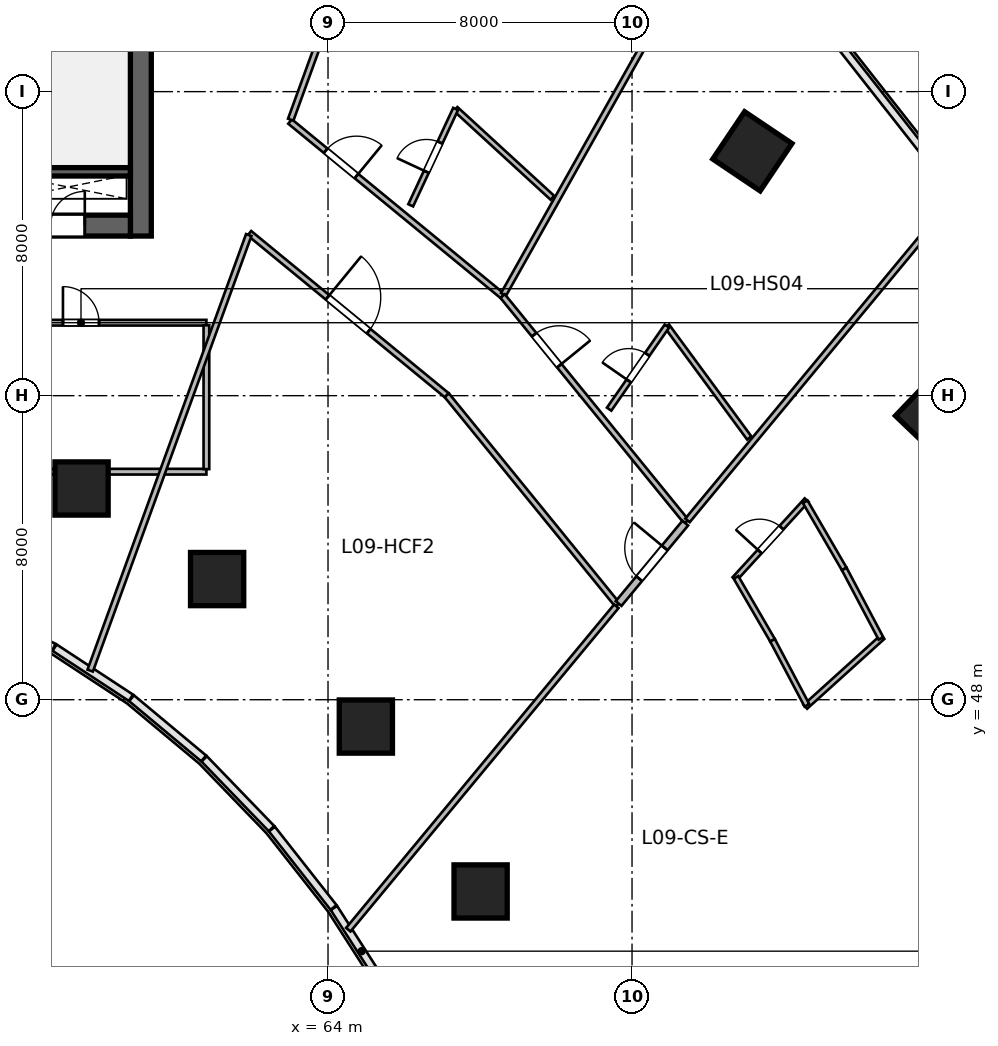
"""IFC4 building model, lengths in metres.
Left out: names, types, materials, properties, quantities, classifications, styles, units other than length and angle.
Written with IfcOpenShell. Run it as: python <this file> out.ifc"""

import sys

from ifc_helpers import new_model, si_unit, direction, frame, frame_2d, origin, origin_2d, place, context, subcontext, project, spatial, rectangle, circle, extrude, source, transform, mapped, element, fill, save


model = new_model("IFC4")
c1 = context("Model", 3, precision=1e-05, world=origin(), true_north=direction((0.0, 1.0)))
c2 = subcontext(c1, "Body", "Model", "MODEL_VIEW")
j1 = project(units=[si_unit("LENGTHUNIT", "METRE"), si_unit("PLANEANGLEUNIT", "RADIAN")], contexts=[c1])
p1 = place(None, origin())
s1 = spatial("IfcSite", under=j1, at=p1, CompositionType="ELEMENT")
p2 = place(p1, origin())
s2 = spatial("IfcBuilding", under=s1, at=p2, CompositionType="ELEMENT")
p3 = place(p2, frame((0.0, 0.0, 46.2)))
s3 = spatial("IfcBuildingStorey", under=s2, at=p3, CompositionType="ELEMENT", Elevation=46.2)
m1 = source(origin(), c2, "Body", "SweptSolid", [
    extrude(rectangle(XDim=12.0, YDim=0.55, at=frame_2d((6.0, 0.0))), origin(), (0.0, 0.0, 1.0), 3.6),
])
p4 = place(p3, frame((59.075, 60.2, 0.0), z_axis=(0.0, 0.0, 1.0), x_axis=(0.0, 1.0, 0.0)))
e1 = element("IfcWall", 1, at=p4, inside=s3, PredefinedType="SHEAR", context=c2, shape_type="MappedRepresentation", body=[
    mapped(m1, transform((0.0, 0.0, 0.0), scale=1.0)),
])
m2 = source(origin(), c2, "Body", "SweptSolid", [
    extrude(rectangle(XDim=21.6, YDim=0.55, at=frame_2d((10.8, 0.0))), origin(), (0.0, 0.0, 1.0), 3.6),
])
p5 = place(p3, frame((37.2, 60.475, 0.0), z_axis=(0.0, 0.0, 1.0), x_axis=(1.0, 0.0, 0.0)))
e2 = element("IfcWall", 2, at=p5, inside=s3, PredefinedType="SHEAR", context=c2, shape_type="MappedRepresentation", body=[
    mapped(m2, transform((0.0, 0.0, 0.0), scale=1.0)),
])
p6 = place(p5, frame((1.1, 0.0, 0.0)))
e3 = element("IfcOpeningElement", 3, at=p6, cuts=e2, PredefinedType="OPENING", context=c2, shape_type="SweptSolid", body=[
    extrude(rectangle(XDim=1.15, YDim=2.15, at=frame_2d((0.575, 1.075))), frame((0.0, 0.285, 0.0), z_axis=(0.0, -1.0, 0.0), x_axis=(1.0, 0.0, 0.0)), (0.0, 0.0, 1.0), 0.57),
])
p7 = place(p5, frame((19.5, 0.0, 0.0)))
e4 = element("IfcOpeningElement", 4, at=p7, cuts=e2, PredefinedType="OPENING", context=c2, shape_type="SweptSolid", body=[
    extrude(rectangle(XDim=0.9, YDim=2.1, at=frame_2d((0.45, 1.05))), frame((0.0, 0.285, 0.0), z_axis=(0.0, -1.0, 0.0), x_axis=(1.0, 0.0, 0.0)), (0.0, 0.0, 1.0), 0.57),
])
p8 = place(p5, frame((12.02, 0.0, 0.0)))
e5 = element("IfcOpeningElement", 5, at=p8, cuts=e2, PredefinedType="OPENING", context=c2, shape_type="SweptSolid", body=[
    extrude(rectangle(XDim=1.6, YDim=2.15, at=frame_2d((0.8, 1.075))), frame((0.0, 0.285, 0.0), z_axis=(0.0, -1.0, 0.0), x_axis=(1.0, 0.0, 0.0)), (0.0, 0.0, 1.0), 0.57),
])
m3 = source(origin(), c2, "Body", "SweptSolid", [
    extrude(rectangle(XDim=3.27, YDim=0.22, at=frame_2d((1.635, 0.0))), origin(), (0.0, 0.0, 1.0), 3.6),
])
p9 = place(p3, frame((55.53, 61.89, 0.0), z_axis=(0.0, 0.0, 1.0), x_axis=(1.0, 0.0, 0.0)))
e6 = element("IfcWall", 6, at=p9, inside=s3, PredefinedType="SHEAR", context=c2, shape_type="MappedRepresentation", body=[
    mapped(m3, transform((0.0, 0.0, 0.0), scale=1.0)),
])
m4 = source(origin(), c2, "Body", "SweptSolid", [
    extrude(circle(Radius=0.7, at=origin_2d()), origin(), (0.0, 0.0, 1.0), 3.6),
])
for number, where, z_axis, x_axis in (
    (7, (57.515, 53.558, 0.0), (0.0, 0.0, 1.0), (0.289, 0.957, 0.0)),
    (8, (61.082, 51.175, 0.0), (0.0, 0.0, 1.0), (0.409, 0.912, 0.0)),
    (9, (64.996, 47.294, 0.0), (0.0, 0.0, 1.0), (0.558, 0.83, 0.0)),
):
    element("IfcColumn", number, at=place(p3, frame(where, z_axis=z_axis, x_axis=x_axis)), inside=s3, PredefinedType="COLUMN", context=c2, shape_type="MappedRepresentation", body=[
        mapped(m4, transform((0.0, 0.0, 0.0), scale=1.0)),
    ])
m5 = source(origin(), c2, "Body", "SweptSolid", [
    extrude(rectangle(XDim=1.5, YDim=1.5, at=origin_2d()), origin(), (0.0, 0.0, 1.0), 3.6),
])
p10 = place(p3, frame((75.167, 62.43, 0.0), z_axis=(0.0, 0.0, 1.0), x_axis=(0.55774510898, 0.830012285095, 0.0)))
e10 = element("IfcColumn", 10, at=p10, inside=s3, PredefinedType="COLUMN", context=c2, shape_type="MappedRepresentation", body=[
    mapped(m5, transform((0.0, 0.0, 0.0), scale=1.0)),
])
p11 = place(p3, frame((68.015, 42.955, 0.0), z_axis=(0.0, 0.0, 1.0), x_axis=(0.690756218984, 0.723087716626, 0.0)))
e11 = element("IfcColumn", 11, at=p11, inside=s3, PredefinedType="COLUMN", context=c2, shape_type="MappedRepresentation", body=[
    mapped(m4, transform((0.0, 0.0, 0.0), scale=1.0)),
])
p12 = place(p3, frame((79.993, 55.494, 0.0), z_axis=(0.0, 0.0, 1.0), x_axis=(0.690756218984, 0.723087716626, 0.0)))
e12 = element("IfcColumn", 12, at=p12, inside=s3, PredefinedType="COLUMN", context=c2, shape_type="MappedRepresentation", body=[
    mapped(m5, transform((0.0, 0.0, 0.0), scale=1.0)),
])
m6 = source(origin(), c2, "Body", "SweptSolid", [
    extrude(rectangle(XDim=6.6, YDim=0.15, at=frame_2d((3.3, 0.0))), origin(), (0.0, 0.0, 1.0), 2.803),
])
p13 = place(p3, frame((54.2, 54.0, 0.0), z_axis=(0.0, 0.0, 1.0), x_axis=(1.0, 0.0, 0.0)))
e13 = element("IfcWall", 13, at=p13, inside=s3, PredefinedType="PARTITIONING", context=c2, shape_type="MappedRepresentation", body=[
    mapped(m6, transform((0.0, 0.0, 0.0), scale=1.0)),
])
m7 = source(origin(), c2, "Body", "SweptSolid", [
    extrude(rectangle(XDim=6.6, YDim=0.15, at=frame_2d((3.3, 0.0))), origin(), (0.0, 0.0, 1.0), 3.36),
])
p14 = place(p3, frame((54.2, 57.92, 0.0), z_axis=(0.0, 0.0, 1.0), x_axis=(1.0, 0.0, 0.0)))
e14 = element("IfcWall", 14, at=p14, inside=s3, PredefinedType="PARTITIONING", context=c2, shape_type="MappedRepresentation", body=[
    mapped(m7, transform((0.0, 0.0, 0.0), scale=1.0)),
])
p15 = place(p14, frame((2.825, 0.0, 0.0)))
e15 = element("IfcOpeningElement", 15, at=p15, cuts=e14, PredefinedType="OPENING", context=c2, shape_type="SweptSolid", body=[
    extrude(rectangle(XDim=0.95, YDim=2.1, at=frame_2d((0.475, 1.05))), frame((0.0, 0.085, 0.0), z_axis=(0.0, -1.0, 0.0), x_axis=(1.0, 0.0, 0.0)), (0.0, 0.0, 1.0), 0.17),
])
m8 = source(origin(), c2, "Body", "SweptSolid", [
    extrude(rectangle(XDim=3.785, YDim=0.15, at=frame_2d((1.893, 0.0))), origin(), (0.0, 0.0, 1.0), 3.36),
])
p16 = place(p3, frame((60.8, 54.067, 0.0), z_axis=(0.0, 0.0, 1.0), x_axis=(0.0, 1.0, 0.0)))
e16 = element("IfcWall", 16, at=p16, inside=s3, PredefinedType="PARTITIONING", context=c2, shape_type="MappedRepresentation", body=[
    mapped(m8, transform((0.0, 0.0, 0.0), scale=1.0)),
])
m9 = source(origin(), c2, "Body", "SweptSolid", [
    extrude(rectangle(XDim=7.237, YDim=0.15, at=frame_2d((3.618, 0.0))), origin(), (0.0, 0.0, 1.0), 3.36),
])
p17 = place(p3, frame((63.001, 63.214, 0.0), z_axis=(0.0, 0.0, 1.0), x_axis=(0.772813707793, -0.634632943557, 0.0)))
e17 = element("IfcWall", 17, at=p17, inside=s3, PredefinedType="PARTITIONING", context=c2, shape_type="MappedRepresentation", body=[
    mapped(m9, transform((0.0, 0.0, 0.0), scale=1.0)),
])
p18 = place(p17, frame((1.212, 0.0, 0.0)))
e18 = element("IfcOpeningElement", 18, at=p18, cuts=e17, PredefinedType="OPENING", context=c2, shape_type="SweptSolid", body=[
    extrude(rectangle(XDim=1.05, YDim=2.15, at=frame_2d((0.525, 1.075))), frame((0.0, 0.085, 0.0), z_axis=(0.0, -1.0, 0.0), x_axis=(1.0, 0.0, 0.0)), (0.0, 0.0, 1.0), 0.17),
])
m10 = source(origin(), c2, "Body", "SweptSolid", [
    extrude(rectangle(XDim=12.088, YDim=0.15, at=frame_2d((6.044, 0.0))), origin(), (0.0, 0.0, 1.0), 3.36),
])
p19 = place(p3, frame((63.019, 63.262, 0.0), z_axis=(0.0, 0.0, 1.0), x_axis=(0.34203007529, 0.939689005787, 0.0)))
e19 = element("IfcWall", 19, at=p19, inside=s3, PredefinedType="PARTITIONING", context=c2, shape_type="MappedRepresentation", body=[
    mapped(m10, transform((0.0, 0.0, 0.0), scale=1.0)),
])
m11 = source(origin(), c2, "Body", "SweptSolid", [
    extrude(rectangle(XDim=11.573, YDim=0.15, at=frame_2d((5.786, 0.0))), origin(), (0.0, 0.0, 1.0), 3.36),
])
p20 = place(p3, frame((68.618, 58.664, 0.0), z_axis=(0.0, 0.0, 1.0), x_axis=(0.490161073951, 0.871631872744, 0.0)))
e20 = element("IfcWall", 20, at=p20, inside=s3, PredefinedType="PARTITIONING", context=c2, shape_type="MappedRepresentation", body=[
    mapped(m11, transform((0.0, 0.0, 0.0), scale=1.0)),
])
m12 = source(origin(), c2, "Body", "SweptSolid", [
    extrude(rectangle(XDim=3.456, YDim=0.14, at=frame_2d((1.728, 0.0))), origin(), (0.0, 0.0, 1.0), 3.36),
])
p21 = place(p3, frame((67.358, 63.544, 0.0), z_axis=(0.0, 0.0, 1.0), x_axis=(0.736860870293, -0.676044420013, 0.0)))
e21 = element("IfcWall", 21, at=p21, inside=s3, PredefinedType="PARTITIONING", context=c2, shape_type="MappedRepresentation", body=[
    mapped(m12, transform((0.0, 0.0, 0.0), scale=1.0)),
])
m13 = source(origin(), c2, "Body", "SweptSolid", [
    extrude(rectangle(XDim=2.796, YDim=0.14, at=frame_2d((1.398, 0.0))), origin(), (0.0, 0.0, 1.0), 3.36),
])
p22 = place(p3, frame((66.177, 61.009, 0.0), z_axis=(0.0, 0.0, 1.0), x_axis=(0.422316594955, 0.906448395456, 0.0)))
e22 = element("IfcWall", 22, at=p22, inside=s3, PredefinedType="PARTITIONING", context=c2, shape_type="MappedRepresentation", body=[
    mapped(m13, transform((0.0, 0.0, 0.0), scale=1.0)),
])
p23 = place(p22, frame((0.973, 0.0, 0.0)))
e23 = element("IfcOpeningElement", 23, at=p23, cuts=e22, PredefinedType="OPENING", context=c2, shape_type="SweptSolid", body=[
    extrude(rectangle(XDim=0.85, YDim=2.05, at=frame_2d((0.425, 1.025))), frame((0.0, 0.08, 0.0), z_axis=(0.0, -1.0, 0.0), x_axis=(1.0, 0.0, 0.0)), (0.0, 0.0, 1.0), 0.16),
])
m14 = source(origin(), c2, "Body", "SweptSolid", [
    extrude(rectangle(XDim=7.659, YDim=0.15, at=frame_2d((3.829, 0.0))), origin(), (0.0, 0.0, 1.0), 3.36),
])
p24 = place(p3, frame((68.594, 58.621, 0.0), z_axis=(0.0, 0.0, 1.0), x_axis=(0.631489868862, -0.775384127723, 0.0)))
e24 = element("IfcWall", 24, at=p24, inside=s3, PredefinedType="PARTITIONING", context=c2, shape_type="MappedRepresentation", body=[
    mapped(m14, transform((0.0, 0.0, 0.0), scale=1.0)),
])
p25 = place(p24, frame((1.313, 0.0, 0.0)))
e25 = element("IfcOpeningElement", 25, at=p25, cuts=e24, PredefinedType="OPENING", context=c2, shape_type="SweptSolid", body=[
    extrude(rectangle(XDim=1.05, YDim=2.15, at=frame_2d((0.525, 1.075))), frame((0.0, 0.085, 0.0), z_axis=(0.0, -1.0, 0.0), x_axis=(1.0, 0.0, 0.0)), (0.0, 0.0, 1.0), 0.17),
])
m15 = source(origin(), c2, "Body", "SweptSolid", [
    extrude(rectangle(XDim=10.975, YDim=0.15, at=frame_2d((5.487, 0.0))), origin(), (0.0, 0.0, 1.0), 3.36),
])
p26 = place(p3, frame((73.46, 52.719, 0.0), z_axis=(0.0, 0.0, 1.0), x_axis=(0.638125265812, 0.769932558821, 0.0)))
e26 = element("IfcWall", 26, at=p26, inside=s3, PredefinedType="PARTITIONING", context=c2, shape_type="MappedRepresentation", body=[
    mapped(m15, transform((0.0, 0.0, 0.0), scale=1.0)),
])
m16 = source(origin(), c2, "Body", "SweptSolid", [
    extrude(rectangle(XDim=3.656, YDim=0.14, at=frame_2d((1.828, 0.0))), origin(), (0.0, 0.0, 1.0), 3.36),
])
p27 = place(p3, frame((72.918, 57.831, 0.0), z_axis=(0.0, 0.0, 1.0), x_axis=(0.592700141555, -0.805423206892, 0.0)))
e27 = element("IfcWall", 27, at=p27, inside=s3, PredefinedType="PARTITIONING", context=c2, shape_type="MappedRepresentation", body=[
    mapped(m16, transform((0.0, 0.0, 0.0), scale=1.0)),
])
m17 = source(origin(), c2, "Body", "SweptSolid", [
    extrude(rectangle(XDim=2.663, YDim=0.14, at=frame_2d((1.332, 0.0))), origin(), (0.0, 0.0, 1.0), 3.36),
])
p28 = place(p3, frame((71.397, 55.645, 0.0), z_axis=(0.0, 0.0, 1.0), x_axis=(0.570905989724, 0.821015438891, 0.0)))
e28 = element("IfcWall", 28, at=p28, inside=s3, PredefinedType="PARTITIONING", context=c2, shape_type="MappedRepresentation", body=[
    mapped(m17, transform((0.0, 0.0, 0.0), scale=1.0)),
])
p29 = place(p28, frame((0.906, 0.0, 0.0)))
e29 = element("IfcOpeningElement", 29, at=p29, cuts=e28, PredefinedType="OPENING", context=c2, shape_type="SweptSolid", body=[
    extrude(rectangle(XDim=0.85, YDim=2.05, at=frame_2d((0.425, 1.025))), frame((0.0, 0.08, 0.0), z_axis=(0.0, -1.0, 0.0), x_axis=(1.0, 0.0, 0.0)), (0.0, 0.0, 1.0), 0.16),
])
m18 = source(origin(), c2, "Body", "SweptSolid", [
    extrude(rectangle(XDim=6.721, YDim=0.15, at=frame_2d((3.361, 0.0))), origin(), (0.0, 0.0, 1.0), 3.36),
])
p30 = place(p3, frame((61.931, 60.275, 0.0), z_axis=(0.0, 0.0, 1.0), x_axis=(0.772828051199, -0.63461547671, 0.0)))
e30 = element("IfcWall", 30, at=p30, inside=s3, PredefinedType="PARTITIONING", context=c2, shape_type="MappedRepresentation", body=[
    mapped(m18, transform((0.0, 0.0, 0.0), scale=1.0)),
])
p31 = place(p30, frame((2.66, 0.0, 0.0)))
e31 = element("IfcOpeningElement", 31, at=p31, cuts=e30, PredefinedType="OPENING", context=c2, shape_type="SweptSolid", body=[
    extrude(rectangle(XDim=1.4, YDim=2.15, at=frame_2d((0.7, 1.075))), frame((0.0, 0.085, 0.0), z_axis=(0.0, -1.0, 0.0), x_axis=(1.0, 0.0, 0.0)), (0.0, 0.0, 1.0), 0.17),
])
m19 = source(origin(), c2, "Body", "SweptSolid", [
    extrude(rectangle(XDim=7.113, YDim=0.15, at=frame_2d((3.556, 0.0))), origin(), (0.0, 0.0, 1.0), 3.36),
])
p32 = place(p3, frame((67.126, 56.01, 0.0), z_axis=(0.0, 0.0, 1.0), x_axis=(0.63149032532, -0.775383755974, 0.0)))
e32 = element("IfcWall", 32, at=p32, inside=s3, PredefinedType="PARTITIONING", context=c2, shape_type="MappedRepresentation", body=[
    mapped(m19, transform((0.0, 0.0, 0.0), scale=1.0)),
])
m20 = source(origin(), c2, "Body", "SweptSolid", [
    extrude(rectangle(XDim=12.196, YDim=0.15, at=frame_2d((6.098, 0.0))), origin(), (0.0, 0.0, 1.0), 3.36),
])
p33 = place(p3, frame((57.742, 48.766, 0.0), z_axis=(0.0, 0.0, 1.0), x_axis=(0.342022711534, 0.939691686031, 0.0)))
e33 = element("IfcWall", 33, at=p33, inside=s3, PredefinedType="PARTITIONING", context=c2, shape_type="MappedRepresentation", body=[
    mapped(m20, transform((0.0, 0.0, 0.0), scale=1.0)),
])
m21 = source(origin(), c2, "Body", "SweptSolid", [
    extrude(rectangle(XDim=11.053, YDim=0.15, at=frame_2d((5.527, 0.0))), origin(), (0.0, 0.0, 1.0), 3.36),
])
p34 = place(p3, frame((64.534, 41.949, 0.0), z_axis=(0.0, 0.0, 1.0), x_axis=(0.638131235571, 0.769927611005, 0.0)))
e34 = element("IfcWall", 34, at=p34, inside=s3, PredefinedType="PARTITIONING", context=c2, shape_type="MappedRepresentation", body=[
    mapped(m21, transform((0.0, 0.0, 0.0), scale=1.0)),
])
m22 = source(origin(), c2, "Body", "SweptSolid", [
    extrude(rectangle(XDim=2.748, YDim=0.195, at=frame_2d((1.374, 0.0))), origin(), (0.0, 0.0, 1.0), 3.36),
])
p35 = place(p3, frame((71.647, 50.531, 0.0), z_axis=(0.0, 0.0, 1.0), x_axis=(0.638111168284, 0.769944242729, 0.0)))
e35 = element("IfcWall", 35, at=p35, inside=s3, PredefinedType="PARTITIONING", context=c2, shape_type="MappedRepresentation", body=[
    mapped(m22, transform((0.0, 0.0, 0.0), scale=1.0)),
])
p36 = place(p35, frame((0.849, 0.0, 0.0)))
e36 = element("IfcOpeningElement", 36, at=p36, cuts=e35, PredefinedType="OPENING", context=c2, shape_type="SweptSolid", body=[
    extrude(rectangle(XDim=1.05, YDim=2.15, at=frame_2d((0.525, 1.075))), frame((0.0, 0.107, 0.0), z_axis=(0.0, -1.0, 0.0), x_axis=(1.0, 0.0, 0.0)), (0.0, 0.0, 1.0), 0.215),
])
m23 = source(origin(), c2, "Body", "SweptSolid", [
    extrude(rectangle(XDim=2.812, YDim=0.14, at=frame_2d((1.406, 0.0))), origin(), (0.0, 0.0, 1.0), 3.36),
])
p37 = place(p3, frame((74.697, 51.177, 0.0), z_axis=(0.0, 0.0, 1.0), x_axis=(0.675119025852, 0.737708818527, 0.0)))
e37 = element("IfcWall", 37, at=p37, inside=s3, PredefinedType="PARTITIONING", context=c2, shape_type="MappedRepresentation", body=[
    mapped(m23, transform((0.0, 0.0, 0.0), scale=1.0)),
])
p38 = place(p37, frame((0.981, 0.0, 0.0)))
e38 = element("IfcOpeningElement", 38, at=p38, cuts=e37, PredefinedType="OPENING", context=c2, shape_type="SweptSolid", body=[
    extrude(rectangle(XDim=0.85, YDim=2.05, at=frame_2d((0.425, 1.025))), frame((0.0, 0.08, 0.0), z_axis=(0.0, -1.0, 0.0), x_axis=(1.0, 0.0, 0.0)), (0.0, 0.0, 1.0), 0.16),
])
m24 = source(origin(), c2, "Body", "SweptSolid", [
    extrude(rectangle(XDim=2.738, YDim=0.14, at=frame_2d((1.369, 0.0))), origin(), (0.0, 0.0, 1.0), 3.36),
])
p39 = place(p3, frame((76.56, 47.814, 0.0), z_axis=(0.0, 0.0, 1.0), x_axis=(0.741873676582, 0.670539669218, 0.0)))
e39 = element("IfcWall", 39, at=p39, inside=s3, PredefinedType="PARTITIONING", context=c2, shape_type="MappedRepresentation", body=[
    mapped(m24, transform((0.0, 0.0, 0.0), scale=1.0)),
])
m25 = source(origin(), c2, "Body", "SweptSolid", [
    extrude(rectangle(XDim=1.914, YDim=0.14, at=frame_2d((0.957, 0.0))), origin(), (0.0, 0.0, 1.0), 3.36),
])
p40 = place(p3, frame((74.736, 51.219, 0.0), z_axis=(0.0, 0.0, 1.0), x_axis=(0.502347790612, -0.864665656347, 0.0)))
e40 = element("IfcWall", 40, at=p40, inside=s3, PredefinedType="PARTITIONING", context=c2, shape_type="MappedRepresentation", body=[
    mapped(m25, transform((0.0, 0.0, 0.0), scale=1.0)),
])
m26 = source(origin(), c2, "Body", "SweptSolid", [
    extrude(rectangle(XDim=2.045, YDim=0.14, at=frame_2d((1.022, 0.0))), origin(), (0.0, 0.0, 1.0), 3.36),
])
p41 = place(p3, frame((76.557, 53.209, 0.0), z_axis=(0.0, 0.0, 1.0), x_axis=(0.5023112139, -0.864686905411, 0.0)))
e41 = element("IfcWall", 41, at=p41, inside=s3, PredefinedType="PARTITIONING", context=c2, shape_type="MappedRepresentation", body=[
    mapped(m26, transform((0.0, 0.0, 0.0), scale=1.0)),
])
m27 = source(origin(), c2, "Body", "SweptSolid", [
    extrude(rectangle(XDim=1.936, YDim=0.14, at=frame_2d((0.968, 0.0))), origin(), (0.0, 0.0, 1.0), 3.36),
])
p42 = place(p3, frame((75.697, 49.563, 0.0), z_axis=(0.0, 0.0, 1.0), x_axis=(0.467174971862, -0.884164886017, 0.0)))
e42 = element("IfcWall", 42, at=p42, inside=s3, PredefinedType="PARTITIONING", context=c2, shape_type="MappedRepresentation", body=[
    mapped(m27, transform((0.0, 0.0, 0.0), scale=1.0)),
])
m28 = source(origin(), c2, "Body", "SweptSolid", [
    extrude(rectangle(XDim=2.068, YDim=0.14, at=frame_2d((1.034, 0.0))), origin(), (0.0, 0.0, 1.0), 3.36),
])
p43 = place(p3, frame((77.584, 51.441, 0.0), z_axis=(0.0, 0.0, 1.0), x_axis=(0.467215057643, -0.884143704333, 0.0)))
e43 = element("IfcWall", 43, at=p43, inside=s3, PredefinedType="PARTITIONING", context=c2, shape_type="MappedRepresentation", body=[
    mapped(m28, transform((0.0, 0.0, 0.0), scale=1.0)),
])
m29 = source(origin(), c2, "Body", "SweptSolid", [
    extrude(rectangle(XDim=0.9, YDim=2.1, at=frame_2d((0.45, 1.05))), frame((0.0, 0.025, 0.0), z_axis=(0.0, -1.0, 0.0), x_axis=(1.0, 0.0, 0.0)), (0.0, 0.0, 1.0), 0.05),
])
p44 = place(p7, origin())
e44 = element("IfcDoor", 44, at=p44, inside=s3, OperationType="SINGLE_SWING_RIGHT", PredefinedType="DOOR", context=c2, shape_type="MappedRepresentation", body=[
    mapped(m29, transform((0.0, 0.0, 0.0), scale=1.0)),
])
fill(e4, e44)
m30 = source(origin(), c2, "Body", "SweptSolid", [
    extrude(rectangle(XDim=0.95, YDim=2.1, at=frame_2d((0.475, 1.05))), frame((0.0, 0.025, 0.0), z_axis=(0.0, -1.0, 0.0), x_axis=(1.0, 0.0, 0.0)), (0.0, 0.0, 1.0), 0.05),
])
p45 = place(p15, origin())
e45 = element("IfcDoor", 45, at=p45, inside=s3, OperationType="SINGLE_SWING_LEFT", PredefinedType="DOOR", context=c2, shape_type="MappedRepresentation", body=[
    mapped(m30, transform((0.0, 0.0, 0.0), scale=1.0)),
])
fill(e15, e45)
m31 = source(origin(), c2, "Body", "SweptSolid", [
    extrude(rectangle(XDim=1.05, YDim=2.15, at=frame_2d((0.525, 1.075))), frame((0.0, 0.025, 0.0), z_axis=(0.0, -1.0, 0.0), x_axis=(1.0, 0.0, 0.0)), (0.0, 0.0, 1.0), 0.05),
])
p46 = place(p18, origin())
e46 = element("IfcDoor", 46, at=p46, inside=s3, OperationType="SINGLE_SWING_RIGHT", PredefinedType="DOOR", context=c2, shape_type="MappedRepresentation", body=[
    mapped(m31, transform((0.0, 0.0, 0.0), scale=1.0)),
])
fill(e18, e46)
m32 = source(origin(), c2, "Body", "SweptSolid", [
    extrude(rectangle(XDim=0.85, YDim=2.05, at=frame_2d((0.425, 1.025))), frame((0.0, 0.025, 0.0), z_axis=(0.0, -1.0, 0.0), x_axis=(1.0, 0.0, 0.0)), (0.0, 0.0, 1.0), 0.05),
])
p47 = place(p23, origin())
e47 = element("IfcDoor", 47, at=p47, inside=s3, OperationType="SINGLE_SWING_LEFT", PredefinedType="DOOR", context=c2, shape_type="MappedRepresentation", body=[
    mapped(m32, transform((0.0, 0.0, 0.0), scale=1.0)),
])
fill(e23, e47)
p48 = place(p25, origin())
e48 = element("IfcDoor", 48, at=p48, inside=s3, OperationType="SINGLE_SWING_RIGHT", PredefinedType="DOOR", context=c2, shape_type="MappedRepresentation", body=[
    mapped(m31, transform((0.0, 0.0, 0.0), scale=1.0)),
])
fill(e25, e48)
p49 = place(p29, origin())
e49 = element("IfcDoor", 49, at=p49, inside=s3, OperationType="SINGLE_SWING_LEFT", PredefinedType="DOOR", context=c2, shape_type="MappedRepresentation", body=[
    mapped(m32, transform((0.0, 0.0, 0.0), scale=1.0)),
])
fill(e29, e49)
m33 = source(origin(), c2, "Body", "SweptSolid", [
    extrude(rectangle(XDim=1.4, YDim=2.15, at=frame_2d((0.7, 1.075))), frame((0.0, 0.025, 0.0), z_axis=(0.0, -1.0, 0.0), x_axis=(1.0, 0.0, 0.0)), (0.0, 0.0, 1.0), 0.05),
])
p50 = place(p31, origin())
e50 = element("IfcDoor", 50, at=p50, inside=s3, OperationType="SINGLE_SWING_LEFT", PredefinedType="DOOR", context=c2, shape_type="MappedRepresentation", body=[
    mapped(m33, transform((0.0, 0.0, 0.0), scale=1.0)),
])
fill(e31, e50)
p51 = place(p36, origin())
e51 = element("IfcDoor", 51, at=p51, inside=s3, OperationType="SINGLE_SWING_RIGHT", PredefinedType="DOOR", context=c2, shape_type="MappedRepresentation", body=[
    mapped(m31, transform((0.0, 0.0, 0.0), scale=1.0)),
])
fill(e36, e51)
p52 = place(p38, origin())
e52 = element("IfcDoor", 52, at=p52, inside=s3, OperationType="SINGLE_SWING_LEFT", PredefinedType="DOOR", context=c2, shape_type="MappedRepresentation", body=[
    mapped(m32, transform((0.0, 0.0, 0.0), scale=1.0)),
])
fill(e38, e52)
save(model, sys.argv[1])
